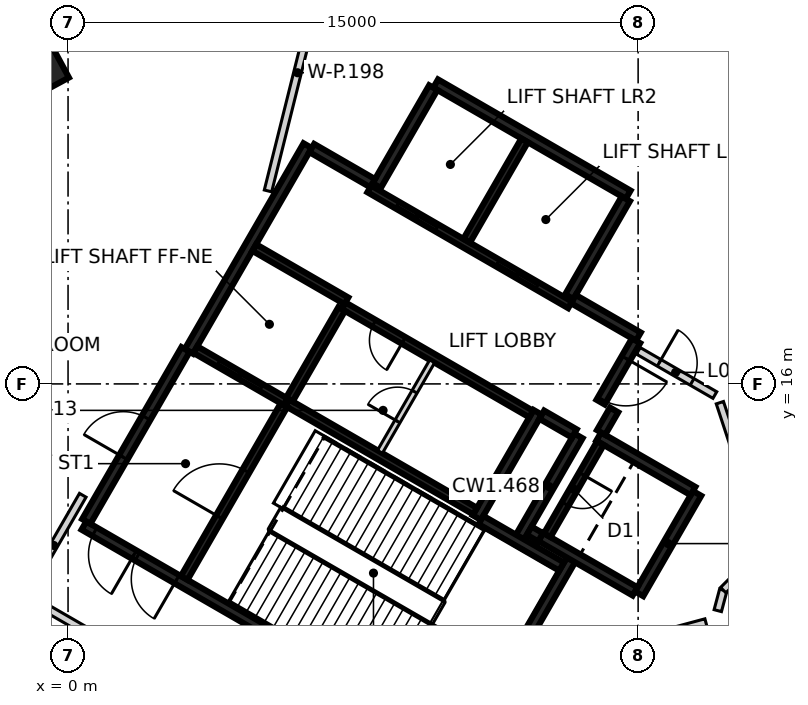
"""IFC4 building model, lengths in metres.
Left out: names, types, materials, properties, quantities, classifications, styles, units other than length and angle.
Written with IfcOpenShell. Run it as: python <this file> out.ifc"""

import sys

from ifc_helpers import new_model, si_unit, direction, frame, frame_2d, origin, origin_2d, place, context, subcontext, project, spatial, rectangle, extrude, element, fill, save


model = new_model("IFC4")
c1 = context("Model", 3, precision=1e-05, world=origin(), true_north=direction((0.0, 1.0)))
c2 = subcontext(c1, "Body", "Model", "MODEL_VIEW")
j1 = project(units=[si_unit("LENGTHUNIT", "METRE"), si_unit("PLANEANGLEUNIT", "RADIAN")], contexts=[c1])
p1 = place(None, origin())
s1 = spatial("IfcSite", under=j1, at=p1, CompositionType="ELEMENT")
p2 = place(p1, origin())
s2 = spatial("IfcBuilding", under=s1, at=p2, CompositionType="ELEMENT")
p3 = place(p2, frame((0.0, 0.0, 29.5)))
s3 = spatial("IfcBuildingStorey", under=s2, at=p3, CompositionType="ELEMENT", Elevation=29.5)
p4 = place(p3, frame((-1.197, 24.423, -0.4), z_axis=(0.0, 0.0, 1.0), x_axis=(-0.476198301069, 0.879337920289, 0.0)))
e1 = element("IfcColumn", 1, at=p4, inside=s3, PredefinedType="COLUMN", context=c2, shape_type="SweptSolid", body=[
    extrude(rectangle(XDim=1.8, YDim=1.8, at=origin_2d()), origin(), (0.0, 0.0, 1.0), 3.025),
])
p5 = place(p3, frame((10.42, 6.498, 0.0), z_axis=(0.0, 0.0, 1.0), x_axis=(-0.866021906294, 0.500006057782, 0.0)))
e2 = element("IfcWall", 2, at=p5, inside=s3, PredefinedType="SHEAR", context=c2, shape_type="SweptSolid", body=[
    extrude(rectangle(XDim=11.55, YDim=0.25, at=frame_2d((5.775, 0.0))), origin(), (0.0, 0.0, 1.0), 5.025),
])
p6 = place(p5, frame((10.025, 0.0, 0.0)))
e3 = element("IfcOpeningElement", 3, at=p6, cuts=e2, PredefinedType="OPENING", context=c2, shape_type="SweptSolid", body=[
    extrude(rectangle(XDim=1.2, YDim=2.1, at=frame_2d((0.6, 1.05))), frame((0.0, 0.135, 0.0), z_axis=(0.0, -1.0, 0.0), x_axis=(1.0, 0.0, 0.0)), (0.0, 0.0, 1.0), 0.27),
])
p7 = place(p5, frame((8.725, 0.0, 0.0)))
e4 = element("IfcOpeningElement", 4, at=p7, cuts=e2, PredefinedType="OPENING", context=c2, shape_type="SweptSolid", body=[
    extrude(rectangle(XDim=1.2, YDim=2.1, at=frame_2d((0.6, 1.05))), frame((0.0, 0.135, 0.0), z_axis=(0.0, -1.0, 0.0), x_axis=(1.0, 0.0, 0.0)), (0.0, 0.0, 1.0), 0.27),
])
p8 = place(p3, frame((3.179, 16.856, 0.0), z_axis=(0.0, 0.0, 1.0), x_axis=(0.500004234368, 0.866022959057, 0.0)))
e5 = element("IfcWall", 5, at=p8, inside=s3, PredefinedType="SHEAR", context=c2, shape_type="SweptSolid", body=[
    extrude(rectangle(XDim=6.25, YDim=0.25, at=frame_2d((3.125, 0.0))), origin(), (0.0, 0.0, 1.0), 5.025),
])
p9 = place(p3, frame((9.673, 23.903, 0.0), z_axis=(0.0, 0.0, 1.0), x_axis=(0.86603616409, -0.499981362141, 0.0)))
e6 = element("IfcWall", 6, at=p9, inside=s3, PredefinedType="SHEAR", context=c2, shape_type="SweptSolid", body=[
    extrude(rectangle(XDim=5.85, YDim=0.25, at=frame_2d((2.925, 0.0))), origin(), (0.0, 0.0, 1.0), 5.025),
])
p10 = place(p3, frame((0.48, 12.381, 0.0), z_axis=(0.0, 0.0, 1.0), x_axis=(0.49999885962, 0.866026062182, 0.0)))
e7 = element("IfcWall", 7, at=p10, inside=s3, PredefinedType="SHEAR", context=c2, shape_type="SweptSolid", body=[
    extrude(rectangle(XDim=5.225, YDim=0.25, at=frame_2d((2.612, 0.0))), origin(), (0.0, 0.0, 1.0), 5.025),
])
p11 = place(p10, frame((1.95, 0.0, 0.0)))
e8 = element("IfcOpeningElement", 8, at=p11, cuts=e7, PredefinedType="OPENING", context=c2, shape_type="SweptSolid", body=[
    extrude(rectangle(XDim=1.2, YDim=2.1, at=frame_2d((0.6, 1.05))), frame((0.0, 0.135, 0.0), z_axis=(0.0, -1.0, 0.0), x_axis=(1.0, 0.0, 0.0)), (0.0, 0.0, 1.0), 0.27),
])
p12 = place(p3, frame((13.238, 11.378, 0.0), z_axis=(0.0, 0.0, 1.0), x_axis=(-0.500008851346, -0.866020293397, 0.0)))
e9 = element("IfcWall", 9, at=p12, inside=s3, PredefinedType="SHEAR", context=c2, shape_type="SweptSolid", body=[
    extrude(rectangle(XDim=5.51, YDim=0.25, at=frame_2d((2.755, 0.0))), origin(), (0.0, 0.0, 1.0), 5.025),
])
p13 = place(p3, frame((12.357, 15.252, 0.0), z_axis=(0.0, 0.0, 1.0), x_axis=(-0.500028443584, -0.866008981251, 0.0)))
e10 = element("IfcWall", 10, at=p13, inside=s3, PredefinedType="SHEAR", context=c2, shape_type="SweptSolid", body=[
    extrude(rectangle(XDim=3.2, YDim=0.25, at=frame_2d((1.6, 0.0))), origin(), (0.0, 0.0, 1.0), 5.025),
])
for number, where, z_axis, x_axis in (
    (11, (8.123, 21.219, 0.0), (0.0, 0.0, 1.0), (0.5, 0.866, 0.0)),
    (12, (14.676, 20.87, 0.0), (0.0, 0.0, 1.0), (-0.5, -0.866, 0.0)),
):
    element("IfcWall", number, at=place(p3, frame(where, z_axis=z_axis, x_axis=x_axis)), inside=s3, PredefinedType="SHEAR", context=c2, shape_type="SweptSolid", body=[
        extrude(rectangle(XDim=2.975, YDim=0.25, at=frame_2d((1.487, 0.0))), origin(), (0.0, 0.0, 1.0), 5.025),
    ])
p14 = place(p3, frame((16.552, 13.119, 0.0), z_axis=(0.0, 0.0, 1.0), x_axis=(-0.499978833458, -0.866037623948, 0.0)))
e13 = element("IfcWall", 13, at=p14, inside=s3, PredefinedType="SHEAR", context=c2, shape_type="SweptSolid", body=[
    extrude(rectangle(XDim=3.05, YDim=0.25, at=frame_2d((1.525, 0.0))), origin(), (0.0, 0.0, 1.0), 5.025),
])
p15 = place(p3, frame((14.918, 10.54, 0.0), z_axis=(0.0, 0.0, 1.0), x_axis=(-0.866063538972, 0.499933942099, 0.0)))
e14 = element("IfcWall", 14, at=p15, inside=s3, PredefinedType="SHEAR", context=c2, shape_type="SweptSolid", body=[
    extrude(rectangle(XDim=2.865, YDim=0.25, at=frame_2d((1.432, 0.0))), origin(), (0.0, 0.0, 1.0), 5.025),
])
p16 = place(p3, frame((13.963, 14.614, 0.0), z_axis=(0.0, 0.0, 1.0), x_axis=(0.866042235819, -0.499970844928, 0.0)))
e15 = element("IfcWall", 15, at=p16, inside=s3, PredefinedType="SHEAR", context=c2, shape_type="SweptSolid", body=[
    extrude(rectangle(XDim=2.865, YDim=0.25, at=frame_2d((1.432, 0.0))), origin(), (0.0, 0.0, 1.0), 5.025),
])
p17 = place(p3, frame((11.888, 11.961, 0.0), z_axis=(0.0, 0.0, 1.0), x_axis=(0.500003324108, 0.866023484601, 0.0)))
e16 = element("IfcWall", 16, at=p17, inside=s3, PredefinedType="SHEAR", context=c2, shape_type="SweptSolid", body=[
    extrude(rectangle(XDim=3.085, YDim=0.25, at=frame_2d((1.542, 0.0))), origin(), (0.0, 0.0, 1.0), 5.025),
])
p18 = place(p3, frame((10.865, 12.418, 0.0), z_axis=(0.0, 0.0, 1.0), x_axis=(0.866026229868, -0.499998569178, 0.0)))
e17 = element("IfcWall", 17, at=p18, inside=s3, PredefinedType="SHEAR", context=c2, shape_type="SweptSolid", body=[
    extrude(rectangle(XDim=2.449, YDim=0.25, at=frame_2d((1.225, 0.0))), origin(), (0.0, 0.0, 1.0), 5.025),
])
p19 = place(p3, frame((13.297, 18.231, 0.0), z_axis=(0.0, 0.0, 1.0), x_axis=(0.866043531843, -0.499968599967, 0.0)))
e18 = element("IfcWall", 18, at=p19, inside=s3, PredefinedType="SHEAR", context=c2, shape_type="SweptSolid", body=[
    extrude(rectangle(XDim=1.975, YDim=0.25, at=frame_2d((0.987, 0.0))), origin(), (0.0, 0.0, 1.0), 5.025),
])
p20 = place(p3, frame((6.413, 22.206, 0.0), z_axis=(0.0, 0.0, 1.0), x_axis=(0.866016279763, -0.500015802937, 0.0)))
e19 = element("IfcWall", 19, at=p20, inside=s3, PredefinedType="SHEAR", context=c2, shape_type="SweptSolid", body=[
    extrude(rectangle(XDim=1.849, YDim=0.25, at=frame_2d((0.925, 0.0))), origin(), (0.0, 0.0, 1.0), 5.025),
])
p21 = place(p3, frame((14.945, 17.135, 0.0), z_axis=(0.0, 0.0, 1.0), x_axis=(-0.499983108224, -0.866035156036, 0.0)))
e20 = element("IfcWall", 20, at=p21, inside=s3, PredefinedType="SHEAR", context=c2, shape_type="SweptSolid", body=[
    extrude(rectangle(XDim=1.865, YDim=0.25, at=frame_2d((0.932, 0.0))), origin(), (0.0, 0.0, 1.0), 5.025),
])
p22 = place(p21, frame((0.535, 0.0, 0.0)))
e21 = element("IfcOpeningElement", 21, at=p22, cuts=e20, PredefinedType="OPENING", context=c2, shape_type="SweptSolid", body=[
    extrude(rectangle(XDim=1.25, YDim=2.1, at=frame_2d((0.625, 1.05))), frame((0.0, 0.135, 0.0), z_axis=(0.0, -1.0, 0.0), x_axis=(1.0, 0.0, 0.0)), (0.0, 0.0, 1.0), 0.27),
])
p23 = place(p3, frame((13.322, 14.695, 0.0), z_axis=(0.0, 0.0, 1.0), x_axis=(-0.866017078145, 0.500014420154, 0.0)))
e22 = element("IfcWall", 22, at=p23, inside=s3, PredefinedType="SHEAR", context=c2, shape_type="SweptSolid", body=[
    extrude(rectangle(XDim=0.989, YDim=0.25, at=frame_2d((0.495, 0.0))), origin(), (0.0, 0.0, 1.0), 5.025),
])
p24 = place(p3, frame((14.368, 15.315, 0.0), z_axis=(0.0, 0.0, 1.0), x_axis=(-0.499897359611, -0.866084655132, 0.0)))
e23 = element("IfcWall", 23, at=p24, inside=s3, PredefinedType="SHEAR", context=c2, shape_type="SweptSolid", body=[
    extrude(rectangle(XDim=0.685, YDim=0.25, at=frame_2d((0.342, 0.0))), origin(), (0.0, 0.0, 1.0), 5.025),
])
p25 = place(p3, frame((12.433, 11.964, 0.0), z_axis=(0.0, 0.0, 1.0), x_axis=(-0.866055875208, 0.499947218231, 0.0)))
e24 = element("IfcWall", 24, at=p25, inside=s3, PredefinedType="SHEAR", context=c2, shape_type="SweptSolid", body=[
    extrude(rectangle(XDim=0.345, YDim=0.25, at=frame_2d((0.172, 0.0))), origin(), (0.0, 0.0, 1.0), 5.025),
])
p26 = place(p3, frame((13.21, 18.08, 0.0), z_axis=(0.0, 0.0, 1.0), x_axis=(-0.866030299012, 0.499991521122, 0.0)))
e25 = element("IfcWall", 25, at=p26, inside=s3, PredefinedType="SHEAR", context=c2, shape_type="SweptSolid", body=[
    extrude(rectangle(XDim=6.1, YDim=0.2, at=frame_2d((3.05, 0.0))), origin(), (0.0, 0.0, 1.0), 5.025),
])
p27 = place(p26, frame((1.0, 0.0, 0.0)))
e26 = element("IfcOpeningElement", 26, at=p27, cuts=e25, PredefinedType="OPENING", context=c2, shape_type="SweptSolid", body=[
    extrude(rectangle(XDim=1.2, YDim=2.1, at=frame_2d((0.6, 1.05))), frame((0.0, 0.11, 0.0), z_axis=(0.0, -1.0, 0.0), x_axis=(1.0, 0.0, 0.0)), (0.0, 0.0, 1.0), 0.22),
])
p28 = place(p26, frame((4.05, 0.0, 0.0)))
e27 = element("IfcOpeningElement", 27, at=p28, cuts=e25, PredefinedType="OPENING", context=c2, shape_type="SweptSolid", body=[
    extrude(rectangle(XDim=1.2, YDim=2.1, at=frame_2d((0.6, 1.05))), frame((0.0, 0.11, 0.0), z_axis=(0.0, -1.0, 0.0), x_axis=(1.0, 0.0, 0.0)), (0.0, 0.0, 1.0), 0.22),
])
p29 = place(p3, frame((5.775, 15.502, 0.0), z_axis=(0.0, 0.0, 1.0), x_axis=(0.866020080793, -0.500009219579, 0.0)))
e28 = element("IfcWall", 28, at=p29, inside=s3, PredefinedType="SHEAR", context=c2, shape_type="SweptSolid", body=[
    extrude(rectangle(XDim=5.699, YDim=0.2, at=frame_2d((2.85, 0.0))), origin(), (0.0, 0.0, 1.0), 5.025),
])
p30 = place(p3, frame((12.185, 15.207, 0.0), z_axis=(0.0, 0.0, 1.0), x_axis=(-0.866020080793, 0.500009219579, 0.0)))
e29 = element("IfcWall", 29, at=p30, inside=s3, PredefinedType="SHEAR", context=c2, shape_type="SweptSolid", body=[
    extrude(rectangle(XDim=5.699, YDim=0.2, at=frame_2d((2.85, 0.0))), origin(), (0.0, 0.0, 1.0), 5.025),
])
p31 = place(p30, frame((3.874, 0.0, 0.0)))
e30 = element("IfcOpeningElement", 30, at=p31, cuts=e29, PredefinedType="OPENING", context=c2, shape_type="SweptSolid", body=[
    extrude(rectangle(XDim=0.9, YDim=2.1, at=frame_2d((0.45, 1.05))), frame((0.0, 0.11, 0.0), z_axis=(0.0, -1.0, 0.0), x_axis=(1.0, 0.0, 0.0)), (0.0, 0.0, 1.0), 0.22),
])
p32 = place(p3, frame((3.057, 10.895, 0.0), z_axis=(0.0, 0.0, 1.0), x_axis=(0.499989418164, 0.866031513124, 0.0)))
e31 = element("IfcWall", 31, at=p32, inside=s3, PredefinedType="SHEAR", context=c2, shape_type="SweptSolid", body=[
    extrude(rectangle(XDim=5.251, YDim=0.2, at=frame_2d((2.625, 0.0))), origin(), (0.0, 0.0, 1.0), 5.025),
])
p33 = place(p32, frame((1.849, 0.0, 0.0)))
e32 = element("IfcOpeningElement", 32, at=p33, cuts=e31, PredefinedType="OPENING", context=c2, shape_type="SweptSolid", body=[
    extrude(rectangle(XDim=1.4, YDim=2.1, at=frame_2d((0.7, 1.05))), frame((0.0, 0.11, 0.0), z_axis=(0.0, -1.0, 0.0), x_axis=(1.0, 0.0, 0.0)), (0.0, 0.0, 1.0), 0.22),
])
p34 = place(p3, frame((10.489, 19.767, 0.0), z_axis=(0.0, 0.0, 1.0), x_axis=(0.499946628782, 0.866056215479, 0.0)))
e33 = element("IfcWall", 33, at=p34, inside=s3, PredefinedType="SHEAR", context=c2, shape_type="SweptSolid", body=[
    extrude(rectangle(XDim=3.048, YDim=0.2, at=frame_2d((1.524, 0.0))), origin(), (0.0, 0.0, 1.0), 5.025),
])
p35 = place(p3, frame((14.008, 14.442, 0.0), z_axis=(0.0, 0.0, 1.0), x_axis=(-0.499986818241, -0.866033014143, 0.0)))
e34 = element("IfcWall", 34, at=p35, inside=s3, PredefinedType="SHEAR", context=c2, shape_type="SweptSolid", body=[
    extrude(rectangle(XDim=2.798, YDim=0.2, at=frame_2d((1.399, 0.0))), origin(), (0.0, 0.0, 1.0), 5.025),
])
p36 = place(p35, frame((0.949, 0.0, 0.0)))
e35 = element("IfcOpeningElement", 35, at=p36, cuts=e34, PredefinedType="OPENING", context=c2, shape_type="SweptSolid", body=[
    extrude(rectangle(XDim=0.9, YDim=2.1, at=frame_2d((0.45, 1.05))), frame((0.0, 0.11, 0.0), z_axis=(0.0, -1.0, 0.0), x_axis=(1.0, 0.0, 0.0)), (0.0, 0.0, 1.0), 0.22),
])
p37 = place(p3, frame((7.199, 17.97, 0.0), z_axis=(0.0, 0.0, 1.0), x_axis=(-0.499968400327, -0.866043647095, 0.0)))
e36 = element("IfcWall", 36, at=p37, inside=s3, PredefinedType="SHEAR", context=c2, shape_type="SweptSolid", body=[
    extrude(rectangle(XDim=2.75, YDim=0.2, at=frame_2d((1.375, 0.0))), origin(), (0.0, 0.0, 1.0), 5.025),
])
p38 = place(p3, frame((5.725, 15.531, 0.0), z_axis=(0.0, 0.0, 1.0), x_axis=(-0.866037306777, 0.499979382845, 0.0)))
e37 = element("IfcWall", 37, at=p38, inside=s3, PredefinedType="SHEAR", context=c2, shape_type="SweptSolid", body=[
    extrude(rectangle(XDim=2.742, YDim=0.2, at=frame_2d((1.371, 0.0))), origin(), (0.0, 0.0, 1.0), 5.025),
])
p39 = place(p38, frame((0.743, 0.0, 0.0)))
e38 = element("IfcOpeningElement", 38, at=p39, cuts=e37, PredefinedType="OPENING", context=c2, shape_type="SweptSolid", body=[
    extrude(rectangle(XDim=1.3, YDim=2.1, at=frame_2d((0.65, 1.05))), frame((0.0, 0.11, 0.0), z_axis=(0.0, -1.0, 0.0), x_axis=(1.0, 0.0, 0.0)), (0.0, 0.0, 1.0), 0.22),
])
p40 = place(p3, frame((4.901, 19.586, 0.0), z_axis=(0.0, 0.0, 1.0), x_axis=(0.866022890907, -0.500004352405, 0.0)))
e39 = element("IfcWall", 39, at=p40, inside=s3, PredefinedType="SHEAR", context=c2, shape_type="SweptSolid", body=[
    extrude(rectangle(XDim=2.799, YDim=0.2, at=frame_2d((1.399, 0.0))), origin(), (0.0, 0.0, 1.0), 5.025),
])
p41 = place(p3, frame((8.207, 14.214, 0.0), z_axis=(0.0, 0.0, 1.0), x_axis=(0.499922376475, 0.866070215109, 0.0)))
e40 = element("IfcWall", 40, at=p41, inside=s3, PredefinedType="PARTITIONING", context=c2, shape_type="SweptSolid", body=[
    extrude(rectangle(XDim=2.749, YDim=0.15, at=frame_2d((1.374, 0.0))), origin(), (0.0, 0.0, 1.0), 5.025),
])
p42 = place(p41, frame((0.924, 0.0, 0.0)))
e41 = element("IfcOpeningElement", 41, at=p42, cuts=e40, PredefinedType="OPENING", context=c2, shape_type="SweptSolid", body=[
    extrude(rectangle(XDim=0.9, YDim=2.1, at=frame_2d((0.45, 1.05))), frame((0.0, 0.085, 0.0), z_axis=(0.0, -1.0, 0.0), x_axis=(1.0, 0.0, 0.0)), (0.0, 0.0, 1.0), 0.17),
])
p43 = place(p3, frame((-1.138, 10.429, 0.0), z_axis=(0.0, 0.0, 1.0), x_axis=(0.865879872582, -0.500251982761, 0.0)))
e42 = element("IfcWall", 42, at=p43, inside=s3, PredefinedType="PARTITIONING", context=c2, shape_type="SweptSolid", body=[
    extrude(rectangle(XDim=2.541, YDim=0.2, at=frame_2d((1.271, 0.0))), origin(), (0.0, 0.0, 1.0), 5.025),
])
p44 = place(p3, frame((-1.138, 10.429, 0.0), z_axis=(0.0, 0.0, 1.0), x_axis=(0.500013496215, 0.866017611601, 0.0)))
e43 = element("IfcWall", 43, at=p44, inside=s3, PredefinedType="PARTITIONING", context=c2, shape_type="SweptSolid", body=[
    extrude(rectangle(XDim=3.05, YDim=0.2, at=frame_2d((1.525, 0.0))), origin(), (0.0, 0.0, 1.0), 5.025),
])
p45 = place(p3, frame((15.005, 16.87, 0.0), z_axis=(0.0, 0.0, 1.0), x_axis=(0.866005508897, -0.500034457374, 0.0)))
e44 = element("IfcWall", 44, at=p45, inside=s3, PredefinedType="PARTITIONING", context=c2, shape_type="SweptSolid", body=[
    extrude(rectangle(XDim=2.325, YDim=0.2, at=frame_2d((1.163, 0.0))), origin(), (0.0, 0.0, 1.0), 5.025),
])
p46 = place(p45, frame((0.633, 0.0, 0.0)))
e45 = element("IfcOpeningElement", 45, at=p46, cuts=e44, PredefinedType="OPENING", context=c2, shape_type="SweptSolid", body=[
    extrude(rectangle(XDim=1.0, YDim=2.1, at=frame_2d((0.5, 1.05))), frame((0.0, 0.11, 0.0), z_axis=(0.0, -1.0, 0.0), x_axis=(1.0, 0.0, 0.0)), (0.0, 0.0, 1.0), 0.22),
])
p47 = place(p3, frame((16.046, 9.524, 0.0), z_axis=(0.0, 0.0, 1.0), x_axis=(0.965760773793, 0.259434245626, 0.0)))
e46 = element("IfcWall", 46, at=p47, inside=s3, PredefinedType="PARTITIONING", context=c2, shape_type="SweptSolid", body=[
    extrude(rectangle(XDim=0.763, YDim=0.2, at=frame_2d((0.382, 0.0))), origin(), (0.0, 0.0, 1.0), 5.025),
])
p48 = place(p3, frame((17.096, 10.034, 0.0), z_axis=(0.0, 0.0, 1.0), x_axis=(0.257717024656, 0.966220438204, 0.0)))
e47 = element("IfcWall", 47, at=p48, inside=s3, PredefinedType="PARTITIONING", context=c2, shape_type="SweptSolid", body=[
    extrude(rectangle(XDim=0.559, YDim=0.2, at=frame_2d((0.279, 0.0))), origin(), (0.0, 0.0, 1.0), 5.025),
])
p49 = place(p3, frame((17.151, 15.506, 0.0), z_axis=(0.0, 0.0, 1.0), x_axis=(0.313631470976, -0.949544785891, 0.0)))
e48 = element("IfcWall", 48, at=p49, inside=s3, PredefinedType="PARTITIONING", context=c2, shape_type="SweptSolid", body=[
    extrude(rectangle(XDim=1.101, YDim=0.2, at=frame_2d((0.55, 0.0))), origin(), (0.0, 0.0, 1.0), 5.025),
])
p50 = place(p3, frame((17.24, 10.574, 0.0), z_axis=(0.0, 0.0, 1.0), x_axis=(0.707106781187, 0.707106781187, 0.0)))
e49 = element("IfcWall", 49, at=p50, inside=s3, PredefinedType="PARTITIONING", context=c2, shape_type="SweptSolid", body=[
    extrude(rectangle(XDim=0.508, YDim=0.2, at=frame_2d((0.254, 0.0))), origin(), (0.0, 0.0, 1.0), 5.025),
])
p51 = place(p3, frame((5.261, 21.078, 0.0), z_axis=(0.0, 0.0, 1.0), x_axis=(0.242123360052, 0.97024547333, 0.0)))
e50 = element("IfcWall", 50, at=p51, inside=s3, PredefinedType="PARTITIONING", context=c2, shape_type="SweptSolid", body=[
    extrude(rectangle(XDim=6.41, YDim=0.2, at=frame_2d((3.205, 0.0))), origin(), (0.0, 0.0, 1.0), 5.025),
])
p52 = place(p39, origin())
e51 = element("IfcDoor", 51, at=p52, inside=s3, OperationType="SLIDING_TO_RIGHT", PredefinedType="DOOR", context=c2, shape_type="SweptSolid", body=[
    extrude(rectangle(XDim=1.3, YDim=2.1, at=frame_2d((0.65, 1.05))), frame((0.0, 0.025, 0.0), z_axis=(0.0, -1.0, 0.0), x_axis=(1.0, 0.0, 0.0)), (0.0, 0.0, 1.0), 0.05),
])
fill(e38, e51)
p53 = place(p27, origin())
e52 = element("IfcDoor", 52, at=p53, inside=s3, OperationType="DOUBLE_DOOR_SLIDING", PredefinedType="DOOR", context=c2, shape_type="SweptSolid", body=[
    extrude(rectangle(XDim=1.2, YDim=2.1, at=frame_2d((0.6, 1.05))), frame((0.0, 0.025, 0.0), z_axis=(0.0, -1.0, 0.0), x_axis=(1.0, 0.0, 0.0)), (0.0, 0.0, 1.0), 0.05),
])
fill(e26, e52)
p54 = place(p28, origin())
e53 = element("IfcDoor", 53, at=p54, inside=s3, OperationType="DOUBLE_DOOR_SLIDING", PredefinedType="DOOR", context=c2, shape_type="SweptSolid", body=[
    extrude(rectangle(XDim=1.2, YDim=2.1, at=frame_2d((0.6, 1.05))), frame((0.0, 0.025, 0.0), z_axis=(0.0, -1.0, 0.0), x_axis=(1.0, 0.0, 0.0)), (0.0, 0.0, 1.0), 0.05),
])
fill(e27, e53)
p55 = place(p22, origin())
e54 = element("IfcDoor", 54, at=p55, inside=s3, OperationType="SINGLE_SWING_LEFT", PredefinedType="DOOR", context=c2, shape_type="SweptSolid", body=[
    extrude(rectangle(XDim=1.25, YDim=2.1, at=frame_2d((0.625, 1.05))), frame((0.0, 0.025, 0.0), z_axis=(0.0, -1.0, 0.0), x_axis=(1.0, 0.0, 0.0)), (0.0, 0.0, 1.0), 0.05),
])
fill(e21, e54)
p56 = place(p6, origin())
e55 = element("IfcDoor", 55, at=p56, inside=s3, OperationType="SINGLE_SWING_LEFT", PredefinedType="DOOR", context=c2, shape_type="SweptSolid", body=[
    extrude(rectangle(XDim=1.2, YDim=2.1, at=frame_2d((0.6, 1.05))), frame((0.0, 0.025, 0.0), z_axis=(0.0, -1.0, 0.0), x_axis=(1.0, 0.0, 0.0)), (0.0, 0.0, 1.0), 0.05),
])
fill(e3, e55)
p57 = place(p7, origin())
e56 = element("IfcDoor", 56, at=p57, inside=s3, OperationType="SINGLE_SWING_RIGHT", PredefinedType="DOOR", context=c2, shape_type="SweptSolid", body=[
    extrude(rectangle(XDim=1.2, YDim=2.1, at=frame_2d((0.6, 1.05))), frame((0.0, 0.025, 0.0), z_axis=(0.0, -1.0, 0.0), x_axis=(1.0, 0.0, 0.0)), (0.0, 0.0, 1.0), 0.05),
])
fill(e4, e56)
p58 = place(p33, origin())
e57 = element("IfcDoor", 57, at=p58, inside=s3, OperationType="SINGLE_SWING_RIGHT", PredefinedType="DOOR", context=c2, shape_type="SweptSolid", body=[
    extrude(rectangle(XDim=1.4, YDim=2.1, at=frame_2d((0.7, 1.05))), frame((0.0, 0.025, 0.0), z_axis=(0.0, -1.0, 0.0), x_axis=(1.0, 0.0, 0.0)), (0.0, 0.0, 1.0), 0.05),
])
fill(e32, e57)
p59 = place(p31, origin())
e58 = element("IfcDoor", 58, at=p59, inside=s3, OperationType="SINGLE_SWING_LEFT", PredefinedType="DOOR", context=c2, shape_type="SweptSolid", body=[
    extrude(rectangle(XDim=0.9, YDim=2.1, at=frame_2d((0.45, 1.05))), frame((0.0, 0.025, 0.0), z_axis=(0.0, -1.0, 0.0), x_axis=(1.0, 0.0, 0.0)), (0.0, 0.0, 1.0), 0.05),
])
fill(e30, e58)
p60 = place(p36, origin())
e59 = element("IfcDoor", 59, at=p60, inside=s3, OperationType="SINGLE_SWING_RIGHT", PredefinedType="DOOR", context=c2, shape_type="SweptSolid", body=[
    extrude(rectangle(XDim=0.9, YDim=2.1, at=frame_2d((0.45, 1.05))), frame((0.0, 0.025, 0.0), z_axis=(0.0, -1.0, 0.0), x_axis=(1.0, 0.0, 0.0)), (0.0, 0.0, 1.0), 0.05),
])
fill(e35, e59)
p61 = place(p42, origin())
e60 = element("IfcDoor", 60, at=p61, inside=s3, OperationType="SINGLE_SWING_LEFT", PredefinedType="DOOR", context=c2, shape_type="SweptSolid", body=[
    extrude(rectangle(XDim=0.9, YDim=2.1, at=frame_2d((0.45, 1.05))), frame((0.0, 0.025, 0.0), z_axis=(0.0, -1.0, 0.0), x_axis=(1.0, 0.0, 0.0)), (0.0, 0.0, 1.0), 0.05),
])
fill(e41, e60)
p62 = place(p11, origin())
e61 = element("IfcDoor", 61, at=p62, inside=s3, OperationType="SINGLE_SWING_LEFT", PredefinedType="DOOR", context=c2, shape_type="SweptSolid", body=[
    extrude(rectangle(XDim=1.2, YDim=2.1, at=frame_2d((0.6, 1.05))), frame((0.0, 0.025, 0.0), z_axis=(0.0, -1.0, 0.0), x_axis=(1.0, 0.0, 0.0)), (0.0, 0.0, 1.0), 0.05),
])
fill(e8, e61)
p63 = place(p46, origin())
e62 = element("IfcDoor", 62, at=p63, inside=s3, OperationType="SINGLE_SWING_LEFT", PredefinedType="DOOR", context=c2, shape_type="SweptSolid", body=[
    extrude(rectangle(XDim=1.0, YDim=2.1, at=frame_2d((0.5, 1.05))), frame((0.0, 0.025, 0.0), z_axis=(0.0, -1.0, 0.0), x_axis=(1.0, 0.0, 0.0)), (0.0, 0.0, 1.0), 0.05),
])
fill(e45, e62)
save(model, sys.argv[1])
